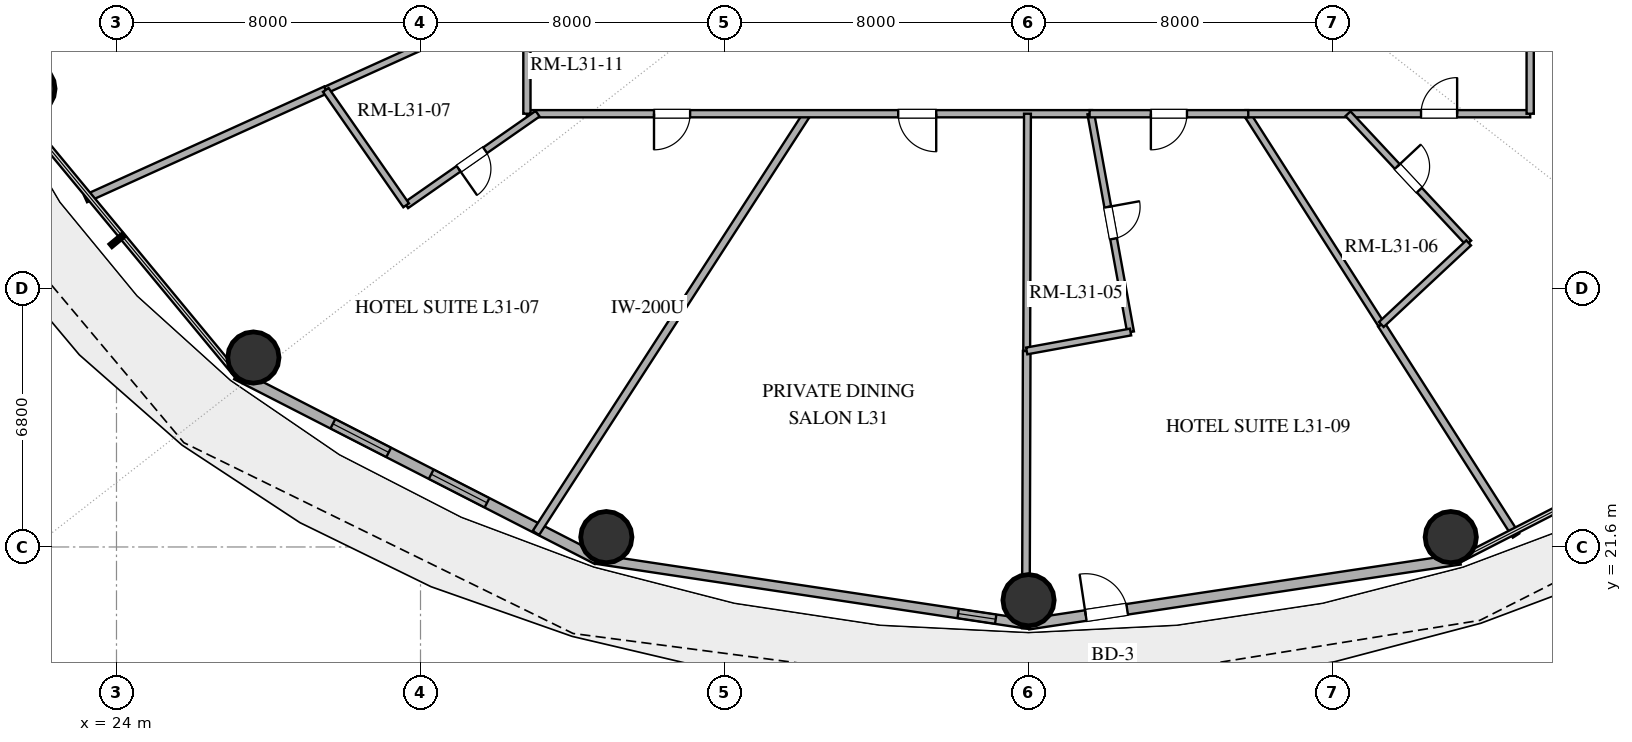
"""IFC4 building model, lengths in metres.
Left out: names, types, materials, properties, quantities, classifications, styles, units other than length and angle.
Written with IfcOpenShell. Run it as: python <this file> out.ifc"""

import sys

from ifc_helpers import new_model, si_unit, direction, frame, frame_2d, origin, origin_2d, place, context, subcontext, project, spatial, rectangle, hollow_circle, extrude, element, fill, save


model = new_model("IFC4")
c1 = context("Model", 3, precision=1e-05, world=origin(), true_north=direction((0.0, 1.0)))
c2 = subcontext(c1, "Body", "Model", "MODEL_VIEW")
j1 = project(units=[si_unit("LENGTHUNIT", "METRE"), si_unit("PLANEANGLEUNIT", "RADIAN")], contexts=[c1])
p1 = place(None, origin())
s1 = spatial("IfcSite", under=j1, at=p1, CompositionType="ELEMENT")
p2 = place(p1, origin())
s2 = spatial("IfcBuilding", under=s1, at=p2, CompositionType="ELEMENT")
p3 = place(p2, frame((0.0, 0.0, 123.6)))
s3 = spatial("IfcBuildingStorey", under=s2, at=p3, CompositionType="ELEMENT", Elevation=123.6)
for number, where, z_axis, x_axis in (
    (1, (21.709, 33.657, 0.0), (0.0, 0.0, 1.0), (1.0, 0.0, 0.0)),
    (2, (27.602, 26.585, 0.0), (0.0, 0.0, 1.0), (1.0, 0.0, 0.0)),
    (3, (36.89, 21.859, 0.0), (0.0, 0.0, 1.0), (1.0, 0.0, 0.0)),
    (4, (48.0, 20.2, 0.0), (0.0, 0.0, 1.0), (1.0, 0.0, 0.0)),
    (5, (59.11, 21.859, 0.0), (0.0, 0.0, 1.0), (1.0, 0.0, 0.0)),
):
    element("IfcColumn", number, at=place(p3, frame(where, z_axis=z_axis, x_axis=x_axis)), inside=s3, PredefinedType="COLUMN", context=c2, shape_type="SweptSolid", body=[
        extrude(hollow_circle(Radius=0.675, WallThickness=0.036, at=origin_2d()), origin(), (0.0, 0.0, 1.0), 3.38),
    ])
p4 = place(p3, frame((27.16, 26.14, 0.0), z_axis=(0.0, 0.0, 1.0), x_axis=(0.889959505023, -0.45603955905, 0.0)))
e6 = element("IfcWall", 6, at=p4, inside=s3, PredefinedType="SOLIDWALL", context=c2, shape_type="SweptSolid", body=[
    extrude(rectangle(XDim=10.662, YDim=0.28, at=frame_2d((5.331, 0.0))), origin(), (0.0, 0.0, 1.0), 3.38),
])
p5 = place(p4, frame((2.848, 0.0, 0.85)))
e7 = element("IfcOpeningElement", 7, at=p5, cuts=e6, PredefinedType="OPENING", context=c2, shape_type="SweptSolid", body=[
    extrude(rectangle(XDim=1.65, YDim=2.0, at=frame_2d((0.825, 1.0))), frame((0.0, 0.15, 0.0), z_axis=(0.0, -1.0, 0.0), x_axis=(1.0, 0.0, 0.0)), (0.0, 0.0, 1.0), 0.3),
])
p6 = place(p4, frame((5.755, 0.0, 0.85)))
e8 = element("IfcOpeningElement", 8, at=p6, cuts=e6, PredefinedType="OPENING", context=c2, shape_type="SweptSolid", body=[
    extrude(rectangle(XDim=1.65, YDim=2.0, at=frame_2d((0.825, 1.0))), frame((0.0, 0.15, 0.0), z_axis=(0.0, -1.0, 0.0), x_axis=(1.0, 0.0, 0.0)), (0.0, 0.0, 1.0), 0.3),
])
p7 = place(p3, frame((36.649, 21.277, 0.0), z_axis=(0.0, 0.0, 1.0), x_axis=(0.988877774656, -0.148730450117, 0.0)))
e9 = element("IfcWall", 9, at=p7, inside=s3, PredefinedType="SOLIDWALL", context=c2, shape_type="SweptSolid", body=[
    extrude(rectangle(XDim=11.479, YDim=0.25, at=frame_2d((5.74, 0.0))), origin(), (0.0, 0.0, 1.0), 3.38),
])
p8 = place(p7, frame((9.605, 0.0, 1.42)))
e10 = element("IfcOpeningElement", 10, at=p8, cuts=e9, PredefinedType="OPENING", context=c2, shape_type="SweptSolid", body=[
    extrude(rectangle(XDim=1.0, YDim=1.05, at=frame_2d((0.5, 0.525))), frame((0.0, 0.135, 0.0), z_axis=(0.0, -1.0, 0.0), x_axis=(1.0, 0.0, 0.0)), (0.0, 0.0, 1.0), 0.27),
])
p9 = place(p3, frame((48.0, 19.57, 0.0), z_axis=(0.0, 0.0, 1.0), x_axis=(0.988877774656, 0.148730450117, 0.0)))
e11 = element("IfcWall", 11, at=p9, inside=s3, PredefinedType="SOLIDWALL", context=c2, shape_type="SweptSolid", body=[
    extrude(rectangle(XDim=11.479, YDim=0.28, at=frame_2d((5.74, 0.0))), origin(), (0.0, 0.0, 1.0), 3.38),
])
p10 = place(p9, frame((1.524, 0.0, 0.0)))
e12 = element("IfcOpeningElement", 12, at=p10, cuts=e11, PredefinedType="OPENING", context=c2, shape_type="SweptSolid", body=[
    extrude(rectangle(XDim=1.1, YDim=2.25, at=frame_2d((0.55, 1.125))), frame((0.0, 0.15, 0.0), z_axis=(0.0, -1.0, 0.0), x_axis=(1.0, 0.0, 0.0)), (0.0, 0.0, 1.0), 0.3),
])
p11 = place(p3, frame((35.037, 21.969, 0.0), z_axis=(0.0, 0.0, 1.0), x_axis=(0.543298274368, 0.839539745973, 0.0)))
e13 = element("IfcWall", 13, at=p11, inside=s3, PredefinedType="PARTITIONING", context=c2, shape_type="SweptSolid", body=[
    extrude(rectangle(XDim=13.139, YDim=0.2, at=frame_2d((6.57, 0.0))), origin(), (0.0, 0.0, 1.0), 2.74),
])
p12 = place(p3, frame((47.928, 19.461, 0.0), z_axis=(0.0, 0.0, 1.0), x_axis=(0.003178198127, 0.999994949516, 0.0)))
e14 = element("IfcWall", 14, at=p12, inside=s3, PredefinedType="PARTITIONING", context=c2, shape_type="SweptSolid", body=[
    extrude(rectangle(XDim=7.298, YDim=0.2, at=frame_2d((3.649, 0.0))), origin(), (0.0, 0.0, 1.0), 2.74),
])
p13 = place(p3, frame((49.671, 33.0, 0.0), z_axis=(0.0, 0.0, 1.0), x_axis=(-1.0, 0.0, 0.0)))
e15 = element("IfcWall", 15, at=p13, inside=s3, PredefinedType="PARTITIONING", context=c2, shape_type="SweptSolid", body=[
    extrude(rectangle(XDim=14.871, YDim=0.19, at=frame_2d((7.436, 0.0))), origin(), (0.0, 0.0, 1.0), 2.74),
])
p14 = place(p13, frame((10.576, 0.0, 0.0)))
e16 = element("IfcOpeningElement", 16, at=p14, cuts=e15, PredefinedType="OPENING", context=c2, shape_type="SweptSolid", body=[
    extrude(rectangle(XDim=0.95, YDim=2.15, at=frame_2d((0.475, 1.075))), frame((0.0, 0.105, 0.0), z_axis=(0.0, -1.0, 0.0), x_axis=(1.0, 0.0, 0.0)), (0.0, 0.0, 1.0), 0.21),
])
p15 = place(p13, frame((4.101, 0.0, 0.0)))
e17 = element("IfcOpeningElement", 17, at=p15, cuts=e15, PredefinedType="OPENING", context=c2, shape_type="SweptSolid", body=[
    extrude(rectangle(XDim=1.0, YDim=2.2, at=frame_2d((0.5, 1.1))), frame((0.0, 0.105, 0.0), z_axis=(0.0, -1.0, 0.0), x_axis=(1.0, 0.0, 0.0)), (0.0, 0.0, 1.0), 0.21),
])
p16 = place(p3, frame((23.185, 30.762, 0.0), z_axis=(0.0, 0.0, 1.0), x_axis=(0.910940213411, 0.412538395292, 0.0)))
e18 = element("IfcWall", 18, at=p16, inside=s3, PredefinedType="PARTITIONING", context=c2, shape_type="SweptSolid", body=[
    extrude(rectangle(XDim=6.941, YDim=0.2, at=frame_2d((3.47, 0.0))), origin(), (0.0, 0.0, 1.0), 2.74),
])
p17 = place(p3, frame((60.828, 21.9, 0.0), z_axis=(0.0, 0.0, 1.0), x_axis=(-0.537968238966, 0.842965108331, 0.0)))
e19 = element("IfcWall", 19, at=p17, inside=s3, PredefinedType="PARTITIONING", context=c2, shape_type="SweptSolid", body=[
    extrude(rectangle(XDim=6.589, YDim=0.2, at=frame_2d((3.295, 0.0))), origin(), (0.0, 0.0, 1.0), 2.74),
])
p18 = place(p3, frame((57.283, 27.454, 0.0), z_axis=(0.0, 0.0, 1.0), x_axis=(-0.537984400251, 0.842954794213, 0.0)))
e20 = element("IfcWall", 20, at=p18, inside=s3, PredefinedType="PLUMBINGWALL", context=c2, shape_type="SweptSolid", body=[
    extrude(rectangle(XDim=6.579, YDim=0.18, at=frame_2d((3.29, 0.0))), origin(), (0.0, 0.0, 1.0), 2.74),
])
p19 = place(p3, frame((47.952, 26.758, 0.0), z_axis=(0.0, 0.0, 1.0), x_axis=(0.003168254458, 0.999994981069, 0.0)))
e21 = element("IfcWall", 21, at=p19, inside=s3, PredefinedType="PLUMBINGWALL", context=c2, shape_type="SweptSolid", body=[
    extrude(rectangle(XDim=6.242, YDim=0.18, at=frame_2d((3.121, 0.0))), origin(), (0.0, 0.0, 1.0), 2.74),
])
p20 = place(p3, frame((66.754, 33.363, 0.0), z_axis=(0.0, 0.0, 1.0), x_axis=(-0.908301480607, 0.418316172681, 0.0)))
e22 = element("IfcWall", 22, at=p20, inside=s3, PredefinedType="PLUMBINGWALL", context=c2, shape_type="SweptSolid", body=[
    extrude(rectangle(XDim=6.115, YDim=0.18, at=frame_2d((3.057, 0.0))), origin(), (0.0, 0.0, 1.0), 2.74),
])
p21 = place(p3, frame((49.638, 33.0, 0.0), z_axis=(0.0, 0.0, 1.0), x_axis=(0.179135653645, -0.983824383512, 0.0)))
e23 = element("IfcWall", 23, at=p21, inside=s3, PredefinedType="PLUMBINGWALL", context=c2, shape_type="SweptSolid", body=[
    extrude(rectangle(XDim=5.839, YDim=0.18, at=frame_2d((2.919, 0.0))), origin(), (0.0, 0.0, 1.0), 2.74),
])
p22 = place(p21, frame((2.494, 0.0, 0.0)))
e24 = element("IfcOpeningElement", 24, at=p22, cuts=e23, PredefinedType="OPENING", context=c2, shape_type="SweptSolid", body=[
    extrude(rectangle(XDim=0.85, YDim=2.1, at=frame_2d((0.425, 1.05))), frame((0.0, 0.1, 0.0), z_axis=(0.0, -1.0, 0.0), x_axis=(1.0, 0.0, 0.0)), (0.0, 0.0, 1.0), 0.2),
])
p23 = place(p3, frame((29.507, 33.625, 0.0), z_axis=(0.0, 0.0, 1.0), x_axis=(0.910959840523, 0.412495053248, 0.0)))
e25 = element("IfcWall", 25, at=p23, inside=s3, PredefinedType="PLUMBINGWALL", context=c2, shape_type="SweptSolid", body=[
    extrude(rectangle(XDim=5.81, YDim=0.18, at=frame_2d((2.905, 0.0))), origin(), (0.0, 0.0, 1.0), 2.74),
])
p24 = place(p3, frame((34.8, 33.0, 0.0), z_axis=(0.0, 0.0, 1.0), x_axis=(0.0, 1.0, 0.0)))
e26 = element("IfcWall", 26, at=p24, inside=s3, PredefinedType="PARTITIONING", context=c2, shape_type="SweptSolid", body=[
    extrude(rectangle(XDim=8.54, YDim=0.19, at=frame_2d((4.27, 0.0))), origin(), (0.0, 0.0, 1.0), 2.74),
])
p25 = place(p24, frame((5.288, 0.0, 0.0)))
e27 = element("IfcOpeningElement", 27, at=p25, cuts=e26, PredefinedType="OPENING", context=c2, shape_type="SweptSolid", body=[
    extrude(rectangle(XDim=0.95, YDim=2.15, at=frame_2d((0.475, 1.075))), frame((0.0, 0.105, 0.0), z_axis=(0.0, -1.0, 0.0), x_axis=(1.0, 0.0, 0.0)), (0.0, 0.0, 1.0), 0.21),
])
p26 = place(p3, frame((53.706, 33.0, 0.0), z_axis=(0.0, 0.0, 1.0), x_axis=(1.0, 0.0, 0.0)))
e28 = element("IfcWall", 28, at=p26, inside=s3, PredefinedType="PARTITIONING", context=c2, shape_type="SweptSolid", body=[
    extrude(rectangle(XDim=7.494, YDim=0.19, at=frame_2d((3.747, 0.0))), origin(), (0.0, 0.0, 1.0), 2.74),
])
p27 = place(p26, frame((4.622, 0.0, 0.0)))
e29 = element("IfcOpeningElement", 29, at=p27, cuts=e28, PredefinedType="OPENING", context=c2, shape_type="SweptSolid", body=[
    extrude(rectangle(XDim=0.95, YDim=2.15, at=frame_2d((0.475, 1.075))), frame((0.0, 0.105, 0.0), z_axis=(0.0, -1.0, 0.0), x_axis=(1.0, 0.0, 0.0)), (0.0, 0.0, 1.0), 0.21),
])
p28 = place(p3, frame((56.406, 33.0, 0.0), z_axis=(0.0, 0.0, 1.0), x_axis=(0.682578142961, -0.730812615348, 0.0)))
e30 = element("IfcWall", 30, at=p28, inside=s3, PredefinedType="PLUMBINGWALL", context=c2, shape_type="SweptSolid", body=[
    extrude(rectangle(XDim=4.652, YDim=0.18, at=frame_2d((2.326, 0.0))), origin(), (0.0, 0.0, 1.0), 2.74),
])
p29 = place(p28, frame((1.901, 0.0, 0.0)))
e31 = element("IfcOpeningElement", 31, at=p29, cuts=e30, PredefinedType="OPENING", context=c2, shape_type="SweptSolid", body=[
    extrude(rectangle(XDim=0.85, YDim=2.1, at=frame_2d((0.425, 1.05))), frame((0.0, 0.1, 0.0), z_axis=(0.0, -1.0, 0.0), x_axis=(1.0, 0.0, 0.0)), (0.0, 0.0, 1.0), 0.2),
])
p30 = place(p3, frame((35.081, 33.0, 0.0), z_axis=(0.0, 0.0, 1.0), x_axis=(-0.820508449427, -0.571634397512, 0.0)))
e32 = element("IfcWall", 32, at=p30, inside=s3, PredefinedType="PLUMBINGWALL", context=c2, shape_type="SweptSolid", body=[
    extrude(rectangle(XDim=4.216, YDim=0.18, at=frame_2d((2.108, 0.0))), origin(), (0.0, 0.0, 1.0), 2.74),
])
p31 = place(p30, frame((1.683, 0.0, 0.0)))
e33 = element("IfcOpeningElement", 33, at=p31, cuts=e32, PredefinedType="OPENING", context=c2, shape_type="SweptSolid", body=[
    extrude(rectangle(XDim=0.85, YDim=2.1, at=frame_2d((0.425, 1.05))), frame((0.0, 0.1, 0.0), z_axis=(0.0, -1.0, 0.0), x_axis=(1.0, 0.0, 0.0)), (0.0, 0.0, 1.0), 0.2),
])
p32 = place(p3, frame((53.782, 33.0, 0.0), z_axis=(0.0, 0.0, 1.0), x_axis=(-1.0, 0.0, 0.0)))
e34 = element("IfcWall", 34, at=p32, inside=s3, PredefinedType="PARTITIONING", context=c2, shape_type="SweptSolid", body=[
    extrude(rectangle(XDim=4.176, YDim=0.19, at=frame_2d((2.088, 0.0))), origin(), (0.0, 0.0, 1.0), 2.74),
])
p33 = place(p32, frame((1.613, 0.0, 0.0)))
e35 = element("IfcOpeningElement", 35, at=p33, cuts=e34, PredefinedType="OPENING", context=c2, shape_type="SweptSolid", body=[
    extrude(rectangle(XDim=0.95, YDim=2.15, at=frame_2d((0.475, 1.075))), frame((0.0, 0.105, 0.0), z_axis=(0.0, -1.0, 0.0), x_axis=(1.0, 0.0, 0.0)), (0.0, 0.0, 1.0), 0.21),
])
p34 = place(p3, frame((31.622, 30.59, 0.0), z_axis=(0.0, 0.0, 1.0), x_axis=(-0.571609603384, 0.820525722521, 0.0)))
e36 = element("IfcWall", 36, at=p34, inside=s3, PredefinedType="PLUMBINGWALL", context=c2, shape_type="SweptSolid", body=[
    extrude(rectangle(XDim=3.7, YDim=0.18, at=frame_2d((1.85, 0.0))), origin(), (0.0, 0.0, 1.0), 2.74),
])
p35 = place(p3, frame((59.581, 29.601, 0.0), z_axis=(0.0, 0.0, 1.0), x_axis=(-0.730840933831, -0.682547822088, 0.0)))
e37 = element("IfcWall", 37, at=p35, inside=s3, PredefinedType="PLUMBINGWALL", context=c2, shape_type="SweptSolid", body=[
    extrude(rectangle(XDim=3.145, YDim=0.18, at=frame_2d((1.572, 0.0))), origin(), (0.0, 0.0, 1.0), 2.74),
])
p36 = place(p3, frame((61.2, 33.0, 0.0), z_axis=(0.0, 0.0, 1.0), x_axis=(0.0, 1.0, 0.0)))
e38 = element("IfcWall", 38, at=p36, inside=s3, PredefinedType="PARTITIONING", context=c2, shape_type="SweptSolid", body=[
    extrude(rectangle(XDim=2.921, YDim=0.19, at=frame_2d((1.46, 0.0))), origin(), (0.0, 0.0, 1.0), 2.74),
])
p37 = place(p3, frame((50.684, 27.256, 0.0), z_axis=(0.0, 0.0, 1.0), x_axis=(-0.983824875987, -0.17913294892, 0.0)))
e39 = element("IfcWall", 39, at=p37, inside=s3, PredefinedType="PLUMBINGWALL", context=c2, shape_type="SweptSolid", body=[
    extrude(rectangle(XDim=2.778, YDim=0.18, at=frame_2d((1.389, 0.0))), origin(), (0.0, 0.0, 1.0), 2.74),
])
p38 = place(p5, origin())
e40 = element("IfcWindow", 40, at=p38, inside=s3, PartitioningType="SINGLE_PANEL", PredefinedType="WINDOW", context=c2, shape_type="SweptSolid", body=[
    extrude(rectangle(XDim=1.65, YDim=2.0, at=frame_2d((0.825, 1.0))), frame((0.0, 0.03, 0.0), z_axis=(0.0, -1.0, 0.0), x_axis=(1.0, 0.0, 0.0)), (0.0, 0.0, 1.0), 0.06),
])
fill(e7, e40)
p39 = place(p6, origin())
e41 = element("IfcWindow", 41, at=p39, inside=s3, PartitioningType="SINGLE_PANEL", PredefinedType="WINDOW", context=c2, shape_type="SweptSolid", body=[
    extrude(rectangle(XDim=1.65, YDim=2.0, at=frame_2d((0.825, 1.0))), frame((0.0, 0.03, 0.0), z_axis=(0.0, -1.0, 0.0), x_axis=(1.0, 0.0, 0.0)), (0.0, 0.0, 1.0), 0.06),
])
fill(e8, e41)
p40 = place(p10, origin())
e42 = element("IfcDoor", 42, at=p40, inside=s3, OperationType="SINGLE_SWING_LEFT", PredefinedType="DOOR", context=c2, shape_type="SweptSolid", body=[
    extrude(rectangle(XDim=1.1, YDim=2.25, at=frame_2d((0.55, 1.125))), frame((0.0, 0.025, 0.0), z_axis=(0.0, -1.0, 0.0), x_axis=(1.0, 0.0, 0.0)), (0.0, 0.0, 1.0), 0.05),
])
fill(e12, e42)
p41 = place(p8, origin())
e43 = element("IfcWindow", 43, at=p41, inside=s3, PartitioningType="SINGLE_PANEL", PredefinedType="WINDOW", context=c2, shape_type="SweptSolid", body=[
    extrude(rectangle(XDim=1.0, YDim=1.05, at=frame_2d((0.5, 0.525))), frame((0.0, 0.03, 0.0), z_axis=(0.0, -1.0, 0.0), x_axis=(1.0, 0.0, 0.0)), (0.0, 0.0, 1.0), 0.06),
])
fill(e10, e43)
p42 = place(p14, origin())
e44 = element("IfcDoor", 44, at=p42, inside=s3, OperationType="SINGLE_SWING_RIGHT", PredefinedType="DOOR", context=c2, shape_type="SweptSolid", body=[
    extrude(rectangle(XDim=0.95, YDim=2.15, at=frame_2d((0.475, 1.075))), frame((0.0, 0.025, 0.0), z_axis=(0.0, -1.0, 0.0), x_axis=(1.0, 0.0, 0.0)), (0.0, 0.0, 1.0), 0.05),
])
fill(e16, e44)
p43 = place(p15, origin())
e45 = element("IfcDoor", 45, at=p43, inside=s3, OperationType="SINGLE_SWING_LEFT", PredefinedType="DOOR", context=c2, shape_type="SweptSolid", body=[
    extrude(rectangle(XDim=1.0, YDim=2.2, at=frame_2d((0.5, 1.1))), frame((0.0, 0.025, 0.0), z_axis=(0.0, -1.0, 0.0), x_axis=(1.0, 0.0, 0.0)), (0.0, 0.0, 1.0), 0.05),
])
fill(e17, e45)
p44 = place(p22, origin())
e46 = element("IfcDoor", 46, at=p44, inside=s3, OperationType="SINGLE_SWING_LEFT", PredefinedType="DOOR", context=c2, shape_type="SweptSolid", body=[
    extrude(rectangle(XDim=0.85, YDim=2.1, at=frame_2d((0.425, 1.05))), frame((0.0, 0.025, 0.0), z_axis=(0.0, -1.0, 0.0), x_axis=(1.0, 0.0, 0.0)), (0.0, 0.0, 1.0), 0.05),
])
fill(e24, e46)
p45 = place(p27, origin())
e47 = element("IfcDoor", 47, at=p45, inside=s3, OperationType="SINGLE_SWING_RIGHT", PredefinedType="DOOR", context=c2, shape_type="SweptSolid", body=[
    extrude(rectangle(XDim=0.95, YDim=2.15, at=frame_2d((0.475, 1.075))), frame((0.0, 0.025, 0.0), z_axis=(0.0, -1.0, 0.0), x_axis=(1.0, 0.0, 0.0)), (0.0, 0.0, 1.0), 0.05),
])
fill(e29, e47)
p46 = place(p29, origin())
e48 = element("IfcDoor", 48, at=p46, inside=s3, OperationType="SINGLE_SWING_LEFT", PredefinedType="DOOR", context=c2, shape_type="SweptSolid", body=[
    extrude(rectangle(XDim=0.85, YDim=2.1, at=frame_2d((0.425, 1.05))), frame((0.0, 0.025, 0.0), z_axis=(0.0, -1.0, 0.0), x_axis=(1.0, 0.0, 0.0)), (0.0, 0.0, 1.0), 0.05),
])
fill(e31, e48)
p47 = place(p31, origin())
e49 = element("IfcDoor", 49, at=p47, inside=s3, OperationType="SINGLE_SWING_RIGHT", PredefinedType="DOOR", context=c2, shape_type="SweptSolid", body=[
    extrude(rectangle(XDim=0.85, YDim=2.1, at=frame_2d((0.425, 1.05))), frame((0.0, 0.025, 0.0), z_axis=(0.0, -1.0, 0.0), x_axis=(1.0, 0.0, 0.0)), (0.0, 0.0, 1.0), 0.05),
])
fill(e33, e49)
p48 = place(p33, origin())
e50 = element("IfcDoor", 50, at=p48, inside=s3, OperationType="SINGLE_SWING_RIGHT", PredefinedType="DOOR", context=c2, shape_type="SweptSolid", body=[
    extrude(rectangle(XDim=0.95, YDim=2.15, at=frame_2d((0.475, 1.075))), frame((0.0, 0.025, 0.0), z_axis=(0.0, -1.0, 0.0), x_axis=(1.0, 0.0, 0.0)), (0.0, 0.0, 1.0), 0.05),
])
fill(e35, e50)
save(model, sys.argv[1])
